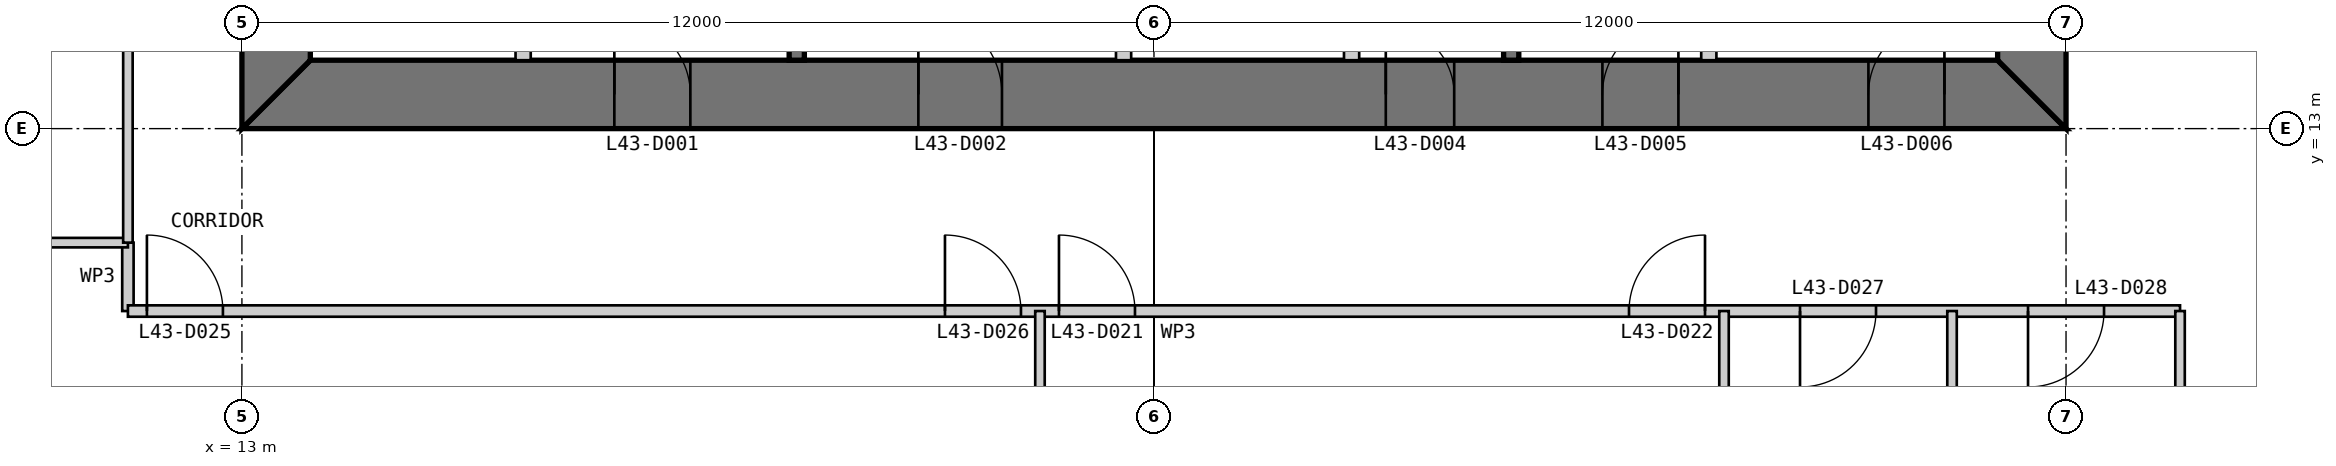
"""IFC4 building model, lengths in metres.
Left out: names, types, materials, properties, quantities, classifications, styles, units other than length and angle.
Written with IfcOpenShell. Run it as: python <this file> out.ifc"""

import sys

from ifc_helpers import new_model, si_unit, direction, frame, frame_2d, origin, place, context, subcontext, project, spatial, polyline, rectangle, outline, extrude, element, fill, save


model = new_model("IFC4")
c1 = context("Model", 3, precision=1e-05, world=origin(), true_north=direction((0.0, 1.0)))
c2 = subcontext(c1, "Body", "Model", "MODEL_VIEW")
j1 = project(units=[si_unit("LENGTHUNIT", "METRE"), si_unit("PLANEANGLEUNIT", "RADIAN")], contexts=[c1])
p1 = place(None, origin())
s1 = spatial("IfcSite", under=j1, at=p1, CompositionType="ELEMENT")
p2 = place(p1, origin())
s2 = spatial("IfcBuilding", under=s1, at=p2, CompositionType="ELEMENT")
p3 = place(p2, frame((0.0, 0.0, 185.8)))
s3 = spatial("IfcBuildingStorey", under=s2, at=p3, CompositionType="ELEMENT", Elevation=185.8)
p4 = place(p3, frame((13.0, 13.45, 0.0), z_axis=(0.0, 0.0, 1.0), x_axis=(1.0, 0.0, 0.0)))
e1 = element("IfcWall", 1, at=p4, inside=s3, PredefinedType="SHEAR", context=c2, shape_type="SweptSolid", body=[
    extrude(outline(polyline([(0.0, -0.45), (24.0, -0.45), (23.1, 0.45), (0.9, 0.45), (0.0, -0.45)])), origin(), (0.0, 0.0, 1.0), 4.0),
])
p5 = place(p4, frame((4.9, 0.0, 0.0)))
e2 = element("IfcOpeningElement", 2, at=p5, cuts=e1, PredefinedType="OPENING", context=c2, shape_type="SweptSolid", body=[
    extrude(rectangle(XDim=1.0, YDim=2.2, at=frame_2d((0.5, 1.1))), frame((0.0, 0.46, 0.0), z_axis=(0.0, -1.0, 0.0), x_axis=(1.0, 0.0, 0.0)), (0.0, 0.0, 1.0), 0.92),
])
p6 = place(p4, frame((8.9, 0.0, 0.0)))
e3 = element("IfcOpeningElement", 3, at=p6, cuts=e1, PredefinedType="OPENING", context=c2, shape_type="SweptSolid", body=[
    extrude(rectangle(XDim=1.1, YDim=2.2, at=frame_2d((0.55, 1.1))), frame((0.0, 0.46, 0.0), z_axis=(0.0, -1.0, 0.0), x_axis=(1.0, 0.0, 0.0)), (0.0, 0.0, 1.0), 0.92),
])
p7 = place(p4, frame((15.05, 0.0, 0.0)))
e4 = element("IfcOpeningElement", 4, at=p7, cuts=e1, PredefinedType="OPENING", context=c2, shape_type="SweptSolid", body=[
    extrude(rectangle(XDim=0.9, YDim=2.2, at=frame_2d((0.45, 1.1))), frame((0.0, 0.46, 0.0), z_axis=(0.0, -1.0, 0.0), x_axis=(1.0, 0.0, 0.0)), (0.0, 0.0, 1.0), 0.92),
])
p8 = place(p4, frame((17.9, 0.0, 0.0)))
e5 = element("IfcOpeningElement", 5, at=p8, cuts=e1, PredefinedType="OPENING", context=c2, shape_type="SweptSolid", body=[
    extrude(rectangle(XDim=1.0, YDim=2.2, at=frame_2d((0.5, 1.1))), frame((0.0, 0.46, 0.0), z_axis=(0.0, -1.0, 0.0), x_axis=(1.0, 0.0, 0.0)), (0.0, 0.0, 1.0), 0.92),
])
p9 = place(p4, frame((21.4, 0.0, 0.0)))
e6 = element("IfcOpeningElement", 6, at=p9, cuts=e1, PredefinedType="OPENING", context=c2, shape_type="SweptSolid", body=[
    extrude(rectangle(XDim=1.0, YDim=2.2, at=frame_2d((0.5, 1.1))), frame((0.0, 0.46, 0.0), z_axis=(0.0, -1.0, 0.0), x_axis=(1.0, 0.0, 0.0)), (0.0, 0.0, 1.0), 0.92),
])
p10 = place(p3, frame((36.55, 13.9, 0.0), z_axis=(0.0, 0.0, 1.0), x_axis=(0.0, 1.0, 0.0)))
e7 = element("IfcWall", 7, at=p10, inside=s3, PredefinedType="SHEAR", context=c2, shape_type="SweptSolid", body=[
    extrude(outline(polyline([(-0.9, -0.45), (23.1, -0.45), (22.2, 0.45), (0.0, 0.45), (-0.9, -0.45)])), origin(), (0.0, 0.0, 1.0), 4.0),
])
p11 = place(p10, frame((20.2, 0.0, 0.0)))
e8 = element("IfcOpeningElement", 8, at=p11, cuts=e7, PredefinedType="OPENING", context=c2, shape_type="SweptSolid", body=[
    extrude(rectangle(XDim=1.0, YDim=2.2, at=frame_2d((0.5, 1.1))), frame((0.0, 0.46, 0.0), z_axis=(0.0, -1.0, 0.0), x_axis=(1.0, 0.0, 0.0)), (0.0, 0.0, 1.0), 0.92),
])
p12 = place(p10, frame((17.25, 0.0, 0.0)))
e9 = element("IfcOpeningElement", 9, at=p12, cuts=e7, PredefinedType="OPENING", context=c2, shape_type="SweptSolid", body=[
    extrude(rectangle(XDim=0.9, YDim=2.2, at=frame_2d((0.45, 1.1))), frame((0.0, 0.46, 0.0), z_axis=(0.0, -1.0, 0.0), x_axis=(1.0, 0.0, 0.0)), (0.0, 0.0, 1.0), 0.92),
])
p13 = place(p3, frame((13.45, 36.1, 0.0), z_axis=(0.0, 0.0, 1.0), x_axis=(0.0, -1.0, 0.0)))
e10 = element("IfcWall", 10, at=p13, inside=s3, PredefinedType="SHEAR", context=c2, shape_type="SweptSolid", body=[
    extrude(outline(polyline([(-0.9, -0.45), (23.1, -0.45), (22.2, 0.45), (0.0, 0.45), (-0.9, -0.45)])), origin(), (0.0, 0.0, 1.0), 4.0),
])
p14 = place(p13, frame((20.2, 0.0, 0.0)))
e11 = element("IfcOpeningElement", 11, at=p14, cuts=e10, PredefinedType="OPENING", context=c2, shape_type="SweptSolid", body=[
    extrude(rectangle(XDim=1.0, YDim=2.2, at=frame_2d((0.5, 1.1))), frame((0.0, 0.46, 0.0), z_axis=(0.0, -1.0, 0.0), x_axis=(1.0, 0.0, 0.0)), (0.0, 0.0, 1.0), 0.92),
])
p15 = place(p13, frame((17.25, 0.0, 0.0)))
e12 = element("IfcOpeningElement", 12, at=p15, cuts=e10, PredefinedType="OPENING", context=c2, shape_type="SweptSolid", body=[
    extrude(rectangle(XDim=0.9, YDim=2.2, at=frame_2d((0.45, 1.1))), frame((0.0, 0.46, 0.0), z_axis=(0.0, -1.0, 0.0), x_axis=(1.0, 0.0, 0.0)), (0.0, 0.0, 1.0), 0.92),
])
p16 = place(p3, frame((16.7, 13.9, 0.0), z_axis=(0.0, 0.0, 1.0), x_axis=(0.0, 1.0, 0.0)))
e13 = element("IfcWall", 13, at=p16, inside=s3, PredefinedType="PARTITIONING", context=c2, shape_type="SweptSolid", body=[
    extrude(rectangle(XDim=16.1, YDim=0.2, at=frame_2d((8.05, 0.0))), origin(), (0.0, 0.0, 1.0), 3.8),
])
p17 = place(p16, frame((9.65, 0.0, 0.0)))
e14 = element("IfcOpeningElement", 14, at=p17, cuts=e13, PredefinedType="OPENING", context=c2, shape_type="SweptSolid", body=[
    extrude(rectangle(XDim=0.9, YDim=2.2, at=frame_2d((0.45, 1.1))), frame((0.0, 0.11, 0.0), z_axis=(0.0, -1.0, 0.0), x_axis=(1.0, 0.0, 0.0)), (0.0, 0.0, 1.0), 0.22),
])
p18 = place(p16, frame((13.65, 0.0, 0.0)))
e15 = element("IfcOpeningElement", 15, at=p18, cuts=e13, PredefinedType="OPENING", context=c2, shape_type="SweptSolid", body=[
    extrude(rectangle(XDim=0.9, YDim=2.2, at=frame_2d((0.45, 1.1))), frame((0.0, 0.11, 0.0), z_axis=(0.0, -1.0, 0.0), x_axis=(1.0, 0.0, 0.0)), (0.0, 0.0, 1.0), 0.22),
])
p19 = place(p3, frame((20.3, 13.9, 0.0), z_axis=(0.0, 0.0, 1.0), x_axis=(0.0, 1.0, 0.0)))
e16 = element("IfcWall", 16, at=p19, inside=s3, PredefinedType="SOLIDWALL", context=c2, shape_type="SweptSolid", body=[
    extrude(rectangle(XDim=16.1, YDim=0.2, at=frame_2d((8.05, 0.0))), origin(), (0.0, 0.0, 1.0), 3.8),
])
p20 = place(p19, frame((10.65, 0.0, 0.0)))
e17 = element("IfcOpeningElement", 17, at=p20, cuts=e16, PredefinedType="OPENING", context=c2, shape_type="SweptSolid", body=[
    extrude(rectangle(XDim=0.9, YDim=2.2, at=frame_2d((0.45, 1.1))), frame((0.0, 0.11, 0.0), z_axis=(0.0, -1.0, 0.0), x_axis=(1.0, 0.0, 0.0)), (0.0, 0.0, 1.0), 0.22),
])
p21 = place(p3, frame((24.6, 13.9, 0.0), z_axis=(0.0, 0.0, 1.0), x_axis=(0.0, 1.0, 0.0)))
e18 = element("IfcWall", 18, at=p21, inside=s3, PredefinedType="PARTITIONING", context=c2, shape_type="SweptSolid", body=[
    extrude(rectangle(XDim=3.3, YDim=0.2, at=frame_2d((1.65, 0.0))), origin(), (0.0, 0.0, 1.0), 3.8),
])
p22 = place(p21, frame((0.9, 0.0, 0.0)))
e19 = element("IfcOpeningElement", 19, at=p22, cuts=e18, PredefinedType="OPENING", context=c2, shape_type="SweptSolid", body=[
    extrude(rectangle(XDim=1.1, YDim=2.2, at=frame_2d((0.55, 1.1))), frame((0.0, 0.11, 0.0), z_axis=(0.0, -1.0, 0.0), x_axis=(1.0, 0.0, 0.0)), (0.0, 0.0, 1.0), 0.22),
])
p23 = place(p3, frame((27.6, 13.9, 0.0), z_axis=(0.0, 0.0, 1.0), x_axis=(0.0, 1.0, 0.0)))
e20 = element("IfcWall", 20, at=p23, inside=s3, PredefinedType="PARTITIONING", context=c2, shape_type="SweptSolid", body=[
    extrude(rectangle(XDim=3.3, YDim=0.2, at=frame_2d((1.65, 0.0))), origin(), (0.0, 0.0, 1.0), 3.8),
])
p24 = place(p3, frame((29.7, 13.9, 0.0), z_axis=(0.0, 0.0, 1.0), x_axis=(0.0, 1.0, 0.0)))
e21 = element("IfcWall", 21, at=p24, inside=s3, PredefinedType="SOLIDWALL", context=c2, shape_type="SweptSolid", body=[
    extrude(rectangle(XDim=6.1, YDim=0.2, at=frame_2d((3.05, 0.0))), origin(), (0.0, 0.0, 1.0), 3.8),
])
p25 = place(p3, frame((32.3, 13.9, 0.0), z_axis=(0.0, 0.0, 1.0), x_axis=(0.0, 1.0, 0.0)))
e22 = element("IfcWall", 22, at=p25, inside=s3, PredefinedType="PARTITIONING", context=c2, shape_type="SweptSolid", body=[
    extrude(rectangle(XDim=6.1, YDim=0.2, at=frame_2d((3.05, 0.0))), origin(), (0.0, 0.0, 1.0), 3.8),
])
p26 = place(p3, frame((11.5, 11.5, 0.0), z_axis=(0.0, 0.0, 1.0), x_axis=(0.0, -1.0, 0.0)))
e23 = element("IfcWall", 23, at=p26, inside=s3, PredefinedType="PARTITIONING", context=c2, shape_type="SweptSolid", body=[
    extrude(rectangle(XDim=0.9, YDim=0.15, at=frame_2d((0.45, 0.0))), origin(), (0.0, 0.0, 1.0), 3.85),
])
p27 = place(p3, frame((11.5, 10.6, 0.0), z_axis=(0.0, 0.0, 1.0), x_axis=(1.0, 0.0, 0.0)))
e24 = element("IfcWall", 24, at=p27, inside=s3, PredefinedType="PARTITIONING", context=c2, shape_type="SweptSolid", body=[
    extrude(rectangle(XDim=27.0, YDim=0.15, at=frame_2d((13.5, 0.0))), origin(), (0.0, 0.0, 1.0), 3.85),
])
p28 = place(p27, frame((12.25, 0.0, 0.0)))
e25 = element("IfcOpeningElement", 25, at=p28, cuts=e24, PredefinedType="OPENING", context=c2, shape_type="SweptSolid", body=[
    extrude(rectangle(XDim=1.0, YDim=2.2, at=frame_2d((0.5, 1.1))), frame((0.0, 0.085, 0.0), z_axis=(0.0, -1.0, 0.0), x_axis=(1.0, 0.0, 0.0)), (0.0, 0.0, 1.0), 0.17),
])
p29 = place(p27, frame((19.75, 0.0, 0.0)))
e26 = element("IfcOpeningElement", 26, at=p29, cuts=e24, PredefinedType="OPENING", context=c2, shape_type="SweptSolid", body=[
    extrude(rectangle(XDim=1.0, YDim=2.2, at=frame_2d((0.5, 1.1))), frame((0.0, 0.085, 0.0), z_axis=(0.0, -1.0, 0.0), x_axis=(1.0, 0.0, 0.0)), (0.0, 0.0, 1.0), 0.17),
])
p30 = place(p27, frame((0.25, 0.0, 0.0)))
e27 = element("IfcOpeningElement", 27, at=p30, cuts=e24, PredefinedType="OPENING", context=c2, shape_type="SweptSolid", body=[
    extrude(rectangle(XDim=1.0, YDim=2.2, at=frame_2d((0.5, 1.1))), frame((0.0, 0.085, 0.0), z_axis=(0.0, -1.0, 0.0), x_axis=(1.0, 0.0, 0.0)), (0.0, 0.0, 1.0), 0.17),
])
p31 = place(p27, frame((10.75, 0.0, 0.0)))
e28 = element("IfcOpeningElement", 28, at=p31, cuts=e24, PredefinedType="OPENING", context=c2, shape_type="SweptSolid", body=[
    extrude(rectangle(XDim=1.0, YDim=2.2, at=frame_2d((0.5, 1.1))), frame((0.0, 0.085, 0.0), z_axis=(0.0, -1.0, 0.0), x_axis=(1.0, 0.0, 0.0)), (0.0, 0.0, 1.0), 0.17),
])
p32 = place(p27, frame((22.0, 0.0, 0.0)))
e29 = element("IfcOpeningElement", 29, at=p32, cuts=e24, PredefinedType="OPENING", context=c2, shape_type="SweptSolid", body=[
    extrude(rectangle(XDim=1.0, YDim=2.2, at=frame_2d((0.5, 1.1))), frame((0.0, 0.085, 0.0), z_axis=(0.0, -1.0, 0.0), x_axis=(1.0, 0.0, 0.0)), (0.0, 0.0, 1.0), 0.17),
])
p33 = place(p27, frame((25.0, 0.0, 0.0)))
e30 = element("IfcOpeningElement", 30, at=p33, cuts=e24, PredefinedType="OPENING", context=c2, shape_type="SweptSolid", body=[
    extrude(rectangle(XDim=1.0, YDim=2.2, at=frame_2d((0.5, 1.1))), frame((0.0, 0.085, 0.0), z_axis=(0.0, -1.0, 0.0), x_axis=(1.0, 0.0, 0.0)), (0.0, 0.0, 1.0), 0.17),
])
p34 = place(p3, frame((0.15, 11.5, 0.0), z_axis=(0.0, 0.0, 1.0), x_axis=(1.0, 0.0, 0.0)))
e31 = element("IfcWall", 31, at=p34, inside=s3, PredefinedType="PARTITIONING", context=c2, shape_type="SweptSolid", body=[
    extrude(rectangle(XDim=11.35, YDim=0.125, at=frame_2d((5.675, 0.0))), origin(), (0.0, 0.0, 1.0), 3.85),
])
p35 = place(p3, frame((23.5, 5.5, 0.0), z_axis=(0.0, 0.0, 1.0), x_axis=(0.0, 1.0, 0.0)))
e32 = element("IfcWall", 32, at=p35, inside=s3, PredefinedType="PARTITIONING", context=c2, shape_type="SweptSolid", body=[
    extrude(rectangle(XDim=5.1, YDim=0.125, at=frame_2d((2.55, 0.0))), origin(), (0.0, 0.0, 1.0), 3.85),
])
p36 = place(p3, frame((32.5, 0.15, 0.0), z_axis=(0.0, 0.0, 1.0), x_axis=(0.0, 1.0, 0.0)))
e33 = element("IfcWall", 33, at=p36, inside=s3, PredefinedType="PARTITIONING", context=c2, shape_type="SweptSolid", body=[
    extrude(rectangle(XDim=10.45, YDim=0.125, at=frame_2d((5.225, 0.0))), origin(), (0.0, 0.0, 1.0), 3.85),
])
p37 = place(p3, frame((35.5, 5.5, 0.0), z_axis=(0.0, 0.0, 1.0), x_axis=(0.0, 1.0, 0.0)))
e34 = element("IfcWall", 34, at=p37, inside=s3, PredefinedType="PARTITIONING", context=c2, shape_type="SweptSolid", body=[
    extrude(rectangle(XDim=5.1, YDim=0.125, at=frame_2d((2.55, 0.0))), origin(), (0.0, 0.0, 1.0), 3.85),
])
p38 = place(p3, frame((38.5, 0.15, 0.0), z_axis=(0.0, 0.0, 1.0), x_axis=(0.0, 1.0, 0.0)))
e35 = element("IfcWall", 35, at=p38, inside=s3, PredefinedType="PARTITIONING", context=c2, shape_type="SweptSolid", body=[
    extrude(rectangle(XDim=10.45, YDim=0.125, at=frame_2d((5.225, 0.0))), origin(), (0.0, 0.0, 1.0), 3.85),
])
p39 = place(p3, frame((11.5, 14.5, 0.0), z_axis=(0.0, 0.0, 1.0), x_axis=(0.0, -1.0, 0.0)))
e36 = element("IfcWall", 36, at=p39, inside=s3, PredefinedType="PARTITIONING", context=c2, shape_type="SweptSolid", body=[
    extrude(rectangle(XDim=3.0, YDim=0.125, at=frame_2d((1.5, 0.0))), origin(), (0.0, 0.0, 1.0), 3.85),
])
p40 = place(p5, origin())
e37 = element("IfcDoor", 37, at=p40, inside=s3, OperationType="SINGLE_SWING_LEFT", PredefinedType="DOOR", context=c2, shape_type="SweptSolid", body=[
    extrude(rectangle(XDim=1.0, YDim=2.2, at=frame_2d((0.5, 1.1))), frame((0.0, 0.025, 0.0), z_axis=(0.0, -1.0, 0.0), x_axis=(1.0, 0.0, 0.0)), (0.0, 0.0, 1.0), 0.05),
    extrude(outline(polyline([(0.0, 0.0), (0.04, 0.0), (0.04, 2.16), (0.96, 2.16), (0.96, 0.0), (1.0, 0.0), (1.0, 2.2), (0.0, 2.2), (0.0, 0.0)])), frame((0.0, 0.3, 0.0), z_axis=(0.0, -1.0, 0.0), x_axis=(1.0, 0.0, 0.0)), (0.0, 0.0, 1.0), 0.6),
])
fill(e2, e37)
p41 = place(p6, origin())
e38 = element("IfcDoor", 38, at=p41, inside=s3, OperationType="SINGLE_SWING_LEFT", PredefinedType="DOOR", context=c2, shape_type="SweptSolid", body=[
    extrude(rectangle(XDim=1.1, YDim=2.2, at=frame_2d((0.55, 1.1))), frame((0.0, 0.025, 0.0), z_axis=(0.0, -1.0, 0.0), x_axis=(1.0, 0.0, 0.0)), (0.0, 0.0, 1.0), 0.05),
    extrude(outline(polyline([(0.0, 0.0), (0.04, 0.0), (0.04, 2.16), (1.06, 2.16), (1.06, 0.0), (1.1, 0.0), (1.1, 2.2), (0.0, 2.2), (0.0, 0.0)])), frame((0.0, 0.3, 0.0), z_axis=(0.0, -1.0, 0.0), x_axis=(1.0, 0.0, 0.0)), (0.0, 0.0, 1.0), 0.6),
])
fill(e3, e38)
p42 = place(p7, origin())
e39 = element("IfcDoor", 39, at=p42, inside=s3, OperationType="SINGLE_SWING_LEFT", PredefinedType="DOOR", context=c2, shape_type="SweptSolid", body=[
    extrude(rectangle(XDim=0.9, YDim=2.2, at=frame_2d((0.45, 1.1))), frame((0.0, 0.025, 0.0), z_axis=(0.0, -1.0, 0.0), x_axis=(1.0, 0.0, 0.0)), (0.0, 0.0, 1.0), 0.05),
    extrude(outline(polyline([(0.0, 0.0), (0.04, 0.0), (0.04, 2.16), (0.86, 2.16), (0.86, 0.0), (0.9, 0.0), (0.9, 2.2), (0.0, 2.2), (0.0, 0.0)])), frame((0.0, 0.3, 0.0), z_axis=(0.0, -1.0, 0.0), x_axis=(1.0, 0.0, 0.0)), (0.0, 0.0, 1.0), 0.6),
])
fill(e4, e39)
p43 = place(p8, origin())
e40 = element("IfcDoor", 40, at=p43, inside=s3, OperationType="SINGLE_SWING_RIGHT", PredefinedType="DOOR", context=c2, shape_type="SweptSolid", body=[
    extrude(rectangle(XDim=1.0, YDim=2.2, at=frame_2d((0.5, 1.1))), frame((0.0, 0.025, 0.0), z_axis=(0.0, -1.0, 0.0), x_axis=(1.0, 0.0, 0.0)), (0.0, 0.0, 1.0), 0.05),
    extrude(outline(polyline([(0.0, 0.0), (0.04, 0.0), (0.04, 2.16), (0.96, 2.16), (0.96, 0.0), (1.0, 0.0), (1.0, 2.2), (0.0, 2.2), (0.0, 0.0)])), frame((0.0, 0.3, 0.0), z_axis=(0.0, -1.0, 0.0), x_axis=(1.0, 0.0, 0.0)), (0.0, 0.0, 1.0), 0.6),
])
fill(e5, e40)
p44 = place(p9, origin())
e41 = element("IfcDoor", 41, at=p44, inside=s3, OperationType="SINGLE_SWING_RIGHT", PredefinedType="DOOR", context=c2, shape_type="SweptSolid", body=[
    extrude(rectangle(XDim=1.0, YDim=2.2, at=frame_2d((0.5, 1.1))), frame((0.0, 0.025, 0.0), z_axis=(0.0, -1.0, 0.0), x_axis=(1.0, 0.0, 0.0)), (0.0, 0.0, 1.0), 0.05),
    extrude(outline(polyline([(0.0, 0.0), (0.04, 0.0), (0.04, 2.16), (0.96, 2.16), (0.96, 0.0), (1.0, 0.0), (1.0, 2.2), (0.0, 2.2), (0.0, 0.0)])), frame((0.0, 0.3, 0.0), z_axis=(0.0, -1.0, 0.0), x_axis=(1.0, 0.0, 0.0)), (0.0, 0.0, 1.0), 0.6),
])
fill(e6, e41)
p45 = place(p28, origin())
e42 = element("IfcDoor", 42, at=p45, inside=s3, OperationType="SINGLE_SWING_LEFT", PredefinedType="DOOR", context=c2, shape_type="SweptSolid", body=[
    extrude(rectangle(XDim=1.0, YDim=2.2, at=frame_2d((0.5, 1.1))), frame((0.0, 0.025, 0.0), z_axis=(0.0, -1.0, 0.0), x_axis=(1.0, 0.0, 0.0)), (0.0, 0.0, 1.0), 0.05),
])
fill(e25, e42)
p46 = place(p29, origin())
e43 = element("IfcDoor", 43, at=p46, inside=s3, OperationType="SINGLE_SWING_RIGHT", PredefinedType="DOOR", context=c2, shape_type="SweptSolid", body=[
    extrude(rectangle(XDim=1.0, YDim=2.2, at=frame_2d((0.5, 1.1))), frame((0.0, 0.025, 0.0), z_axis=(0.0, -1.0, 0.0), x_axis=(1.0, 0.0, 0.0)), (0.0, 0.0, 1.0), 0.05),
])
fill(e26, e43)
p47 = place(p30, origin())
e44 = element("IfcDoor", 44, at=p47, inside=s3, OperationType="SINGLE_SWING_LEFT", PredefinedType="DOOR", context=c2, shape_type="SweptSolid", body=[
    extrude(rectangle(XDim=1.0, YDim=2.2, at=frame_2d((0.5, 1.1))), frame((0.0, 0.025, 0.0), z_axis=(0.0, -1.0, 0.0), x_axis=(1.0, 0.0, 0.0)), (0.0, 0.0, 1.0), 0.05),
])
fill(e27, e44)
p48 = place(p31, origin())
e45 = element("IfcDoor", 45, at=p48, inside=s3, OperationType="SINGLE_SWING_LEFT", PredefinedType="DOOR", context=c2, shape_type="SweptSolid", body=[
    extrude(rectangle(XDim=1.0, YDim=2.2, at=frame_2d((0.5, 1.1))), frame((0.0, 0.025, 0.0), z_axis=(0.0, -1.0, 0.0), x_axis=(1.0, 0.0, 0.0)), (0.0, 0.0, 1.0), 0.05),
])
fill(e28, e45)
p49 = place(p32, frame((1.0, 0.0, 0.0), z_axis=(0.0, 0.0, 1.0), x_axis=(-1.0, 0.0, 0.0)))
e46 = element("IfcDoor", 46, at=p49, inside=s3, OperationType="SINGLE_SWING_RIGHT", PredefinedType="DOOR", context=c2, shape_type="SweptSolid", body=[
    extrude(rectangle(XDim=1.0, YDim=2.2, at=frame_2d((0.5, 1.1))), frame((0.0, 0.025, 0.0), z_axis=(0.0, -1.0, 0.0), x_axis=(1.0, 0.0, 0.0)), (0.0, 0.0, 1.0), 0.05),
])
fill(e29, e46)
p50 = place(p33, frame((1.0, 0.0, 0.0), z_axis=(0.0, 0.0, 1.0), x_axis=(-1.0, 0.0, 0.0)))
e47 = element("IfcDoor", 47, at=p50, inside=s3, OperationType="SINGLE_SWING_RIGHT", PredefinedType="DOOR", context=c2, shape_type="SweptSolid", body=[
    extrude(rectangle(XDim=1.0, YDim=2.2, at=frame_2d((0.5, 1.1))), frame((0.0, 0.025, 0.0), z_axis=(0.0, -1.0, 0.0), x_axis=(1.0, 0.0, 0.0)), (0.0, 0.0, 1.0), 0.05),
])
fill(e30, e47)
save(model, sys.argv[1])
